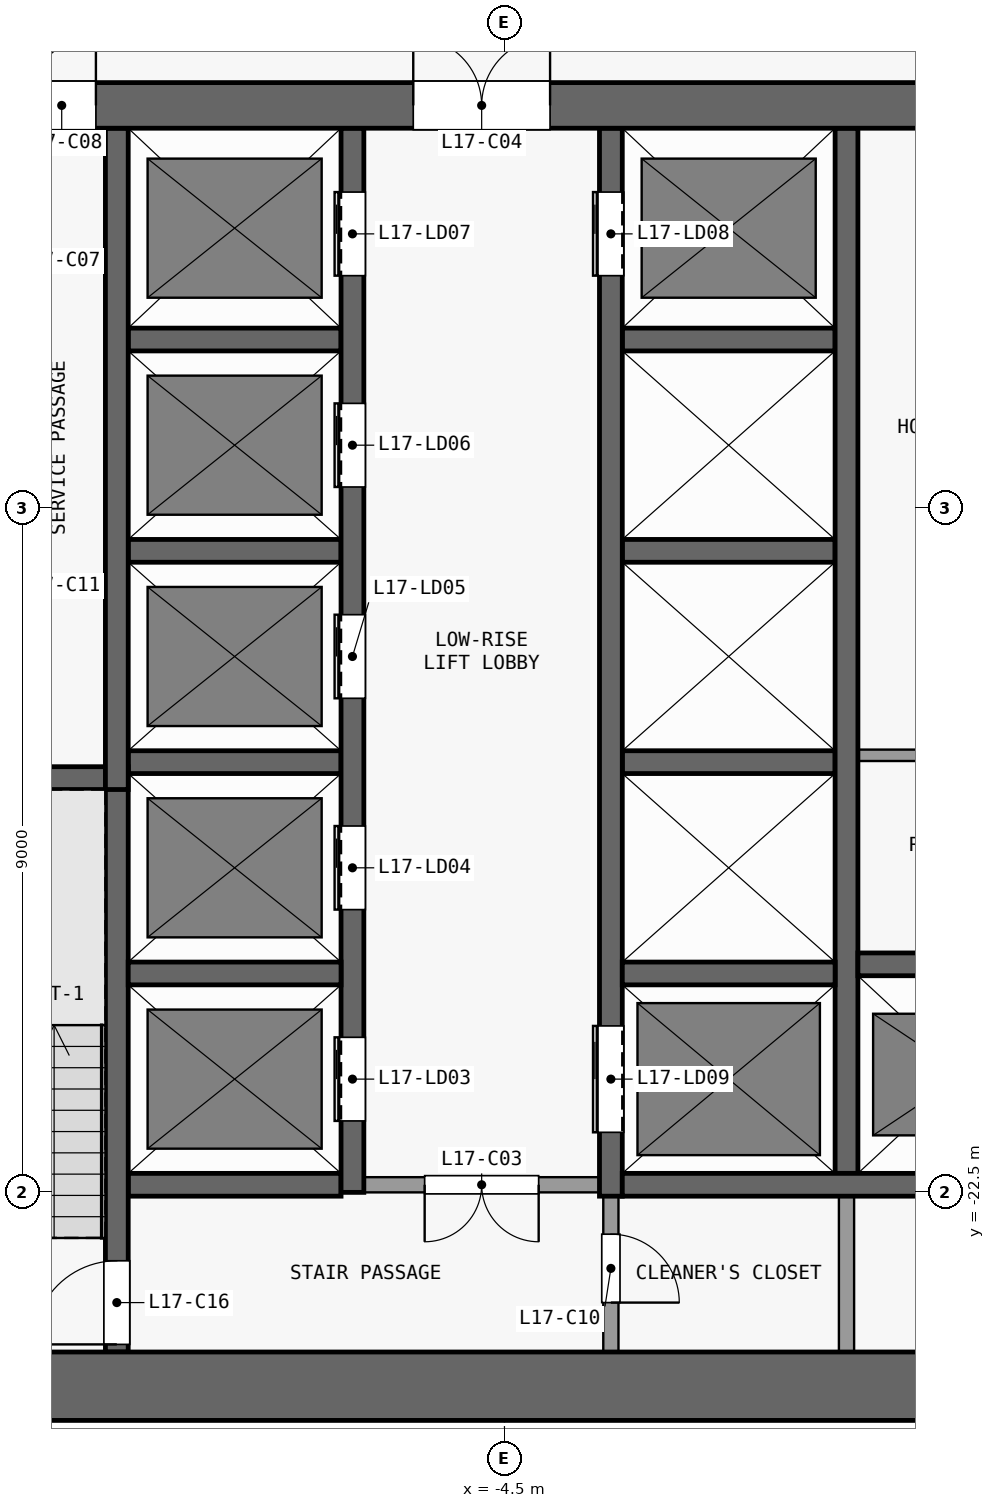
"""IFC4 building model, lengths in metres.
Left out: names, types, materials, properties, quantities, classifications, styles, units other than length and angle.
Written with IfcOpenShell. Run it as: python <this file> out.ifc"""

import sys

from ifc_helpers import new_model, si_unit, direction, frame, frame_2d, origin, place, context, subcontext, project, spatial, rectangle, extrude, element, fill, save


model = new_model("IFC4")
c1 = context("Model", 3, precision=1e-05, world=origin(), true_north=direction((0.0, 1.0)))
c2 = subcontext(c1, "Body", "Model", "MODEL_VIEW")
j1 = project(units=[si_unit("LENGTHUNIT", "METRE"), si_unit("PLANEANGLEUNIT", "RADIAN")], contexts=[c1])
p1 = place(None, origin())
s1 = spatial("IfcSite", under=j1, at=p1, CompositionType="ELEMENT")
p2 = place(p1, origin())
s2 = spatial("IfcBuilding", under=s1, at=p2, CompositionType="ELEMENT")
p3 = place(p2, frame((0.0, 0.0, 72.1)))
s3 = spatial("IfcBuildingStorey", under=s2, at=p3, CompositionType="ELEMENT", Elevation=72.1)
p4 = place(p3, frame((-13.5, -25.05, 0.0), z_axis=(0.0, 0.0, 1.0), x_axis=(1.0, 0.0, 0.0)))
e1 = element("IfcWall", 1, at=p4, inside=s3, PredefinedType="SHEAR", context=c2, shape_type="SweptSolid", body=[
    extrude(rectangle(XDim=27.0, YDim=0.9, at=frame_2d((13.5, 0.0))), origin(), (0.0, 0.0, 1.0), 3.15),
])
p5 = place(p3, frame((-13.5, -8.2, 0.0), z_axis=(0.0, 0.0, 1.0), x_axis=(1.0, 0.0, 0.0)))
e2 = element("IfcWall", 2, at=p5, inside=s3, PredefinedType="SHEAR", context=c2, shape_type="SweptSolid", body=[
    extrude(rectangle(XDim=27.0, YDim=0.6, at=frame_2d((13.5, 0.0))), origin(), (0.0, 0.0, 1.0), 3.15),
])
p6 = place(p5, frame((7.8, 0.0, 0.0)))
e3 = element("IfcOpeningElement", 3, at=p6, cuts=e2, PredefinedType="OPENING", context=c2, shape_type="SweptSolid", body=[
    extrude(rectangle(XDim=1.8, YDim=2.1, at=frame_2d((0.9, 1.05))), frame((0.0, 0.31, 0.0), z_axis=(0.0, -1.0, 0.0), x_axis=(1.0, 0.0, 0.0)), (0.0, 0.0, 1.0), 0.62),
])
p7 = place(p5, frame((17.4, 0.0, 0.0)))
e4 = element("IfcOpeningElement", 4, at=p7, cuts=e2, PredefinedType="OPENING", context=c2, shape_type="SweptSolid", body=[
    extrude(rectangle(XDim=1.8, YDim=2.1, at=frame_2d((0.9, 1.05))), frame((0.0, 0.31, 0.0), z_axis=(0.0, -1.0, 0.0), x_axis=(1.0, 0.0, 0.0)), (0.0, 0.0, 1.0), 0.62),
])
p8 = place(p5, frame((2.725, 0.0, 0.0)))
e5 = element("IfcOpeningElement", 5, at=p8, cuts=e2, PredefinedType="OPENING", context=c2, shape_type="SweptSolid", body=[
    extrude(rectangle(XDim=0.9, YDim=2.1, at=frame_2d((0.45, 1.05))), frame((0.0, 0.31, 0.0), z_axis=(0.0, -1.0, 0.0), x_axis=(1.0, 0.0, 0.0)), (0.0, 0.0, 1.0), 0.62),
])
p9 = place(p5, frame((24.075, 0.0, 0.0)))
e6 = element("IfcOpeningElement", 6, at=p9, cuts=e2, PredefinedType="OPENING", context=c2, shape_type="SweptSolid", body=[
    extrude(rectangle(XDim=1.2, YDim=2.1, at=frame_2d((0.6, 1.05))), frame((0.0, 0.31, 0.0), z_axis=(0.0, -1.0, 0.0), x_axis=(1.0, 0.0, 0.0)), (0.0, 0.0, 1.0), 0.62),
])
p10 = place(p3, frame((-9.45, -22.4, 0.0), z_axis=(0.0, 0.0, 1.0), x_axis=(1.0, 0.0, 0.0)))
e7 = element("IfcWall", 7, at=p10, inside=s3, PredefinedType="SHEAR", context=c2, shape_type="SweptSolid", body=[
    extrude(rectangle(XDim=2.8, YDim=0.3, at=frame_2d((1.4, 0.0))), origin(), (0.0, 0.0, 1.0), 3.15),
])
p11 = place(p3, frame((-3.25, -22.4, 0.0), z_axis=(0.0, 0.0, 1.0), x_axis=(-1.0, 0.0, 0.0)))
e8 = element("IfcWall", 8, at=p11, inside=s3, PredefinedType="PARTITIONING", context=c2, shape_type="SweptSolid", body=[
    extrude(rectangle(XDim=3.1, YDim=0.2, at=frame_2d((1.55, 0.0))), origin(), (0.0, 0.0, 1.0), 3.15),
])
p12 = place(p11, frame((0.8, 0.0, 0.0)))
e9 = element("IfcOpeningElement", 9, at=p12, cuts=e8, PredefinedType="OPENING", context=c2, shape_type="SweptSolid", body=[
    extrude(rectangle(XDim=1.5, YDim=2.1, at=frame_2d((0.75, 1.05))), frame((0.0, 0.11, 0.0), z_axis=(0.0, -1.0, 0.0), x_axis=(1.0, 0.0, 0.0)), (0.0, 0.0, 1.0), 0.22),
])
p13 = place(p3, frame((-2.95, -22.4, 0.0), z_axis=(0.0, 0.0, 1.0), x_axis=(1.0, 0.0, 0.0)))
e10 = element("IfcWall", 10, at=p13, inside=s3, PredefinedType="SHEAR", context=c2, shape_type="SweptSolid", body=[
    extrude(rectangle(XDim=6.2, YDim=0.3, at=frame_2d((3.1, 0.0))), origin(), (0.0, 0.0, 1.0), 3.15),
])
for number, where, z_axis, x_axis in (
    (11, (-9.45, -19.62, 0.0), (0.0, 0.0, 1.0), (1.0, 0.0, 0.0)),
    (12, (-2.95, -19.62, 0.0), (0.0, 0.0, 1.0), (1.0, 0.0, 0.0)),
):
    element("IfcWall", number, at=place(p3, frame(where, z_axis=z_axis, x_axis=x_axis)), inside=s3, PredefinedType="SHEAR", context=c2, shape_type="SweptSolid", body=[
        extrude(rectangle(XDim=2.8, YDim=0.3, at=frame_2d((1.4, 0.0))), origin(), (0.0, 0.0, 1.0), 3.15),
    ])
p14 = place(p3, frame((0.15, -19.5, 0.0), z_axis=(0.0, 0.0, 1.0), x_axis=(1.0, 0.0, 0.0)))
e13 = element("IfcWall", 13, at=p14, inside=s3, PredefinedType="SHEAR", context=c2, shape_type="SweptSolid", body=[
    extrude(rectangle(XDim=3.025, YDim=0.3, at=frame_2d((1.513, 0.0))), origin(), (0.0, 0.0, 1.0), 3.15),
])
p15 = place(p3, frame((-12.6, -17.05, 0.0), z_axis=(0.0, 0.0, 1.0), x_axis=(1.0, 0.0, 0.0)))
e14 = element("IfcWall", 14, at=p15, inside=s3, PredefinedType="SHEAR", context=c2, shape_type="SweptSolid", body=[
    extrude(rectangle(XDim=2.85, YDim=0.3, at=frame_2d((1.425, 0.0))), origin(), (0.0, 0.0, 1.0), 3.15),
])
for number, where, z_axis, x_axis in (
    (15, (-9.45, -16.84, 0.0), (0.0, 0.0, 1.0), (1.0, 0.0, 0.0)),
    (16, (-2.95, -16.84, 0.0), (0.0, 0.0, 1.0), (1.0, 0.0, 0.0)),
):
    element("IfcWall", number, at=place(p3, frame(where, z_axis=z_axis, x_axis=x_axis)), inside=s3, PredefinedType="SHEAR", context=c2, shape_type="SweptSolid", body=[
        extrude(rectangle(XDim=2.8, YDim=0.3, at=frame_2d((1.4, 0.0))), origin(), (0.0, 0.0, 1.0), 3.15),
    ])
p16 = place(p3, frame((0.15, -16.75, 0.0), z_axis=(0.0, 0.0, 1.0), x_axis=(1.0, 0.0, 0.0)))
e17 = element("IfcWall", 17, at=p16, inside=s3, PredefinedType="PARTITIONING", context=c2, shape_type="SweptSolid", body=[
    extrude(rectangle(XDim=2.875, YDim=0.15, at=frame_2d((1.438, 0.0))), origin(), (0.0, 0.0, 1.0), 3.15),
])
for number, where, z_axis, x_axis in (
    (18, (-9.45, -14.06, 0.0), (0.0, 0.0, 1.0), (1.0, 0.0, 0.0)),
    (19, (-2.95, -14.06, 0.0), (0.0, 0.0, 1.0), (1.0, 0.0, 0.0)),
    (20, (-9.45, -11.28, 0.0), (0.0, 0.0, 1.0), (1.0, 0.0, 0.0)),
    (21, (-2.95, -11.28, 0.0), (0.0, 0.0, 1.0), (1.0, 0.0, 0.0)),
):
    element("IfcWall", number, at=place(p3, frame(where, z_axis=z_axis, x_axis=x_axis)), inside=s3, PredefinedType="SHEAR", context=c2, shape_type="SweptSolid", body=[
        extrude(rectangle(XDim=2.8, YDim=0.3, at=frame_2d((1.4, 0.0))), origin(), (0.0, 0.0, 1.0), 3.15),
    ])
p17 = place(p3, frame((-9.6, -24.6, 0.0), z_axis=(0.0, 0.0, 1.0), x_axis=(0.0, 1.0, 0.0)))
e22 = element("IfcWall", 22, at=p17, inside=s3, PredefinedType="SHEAR", context=c2, shape_type="SweptSolid", body=[
    extrude(rectangle(XDim=7.7, YDim=0.3, at=frame_2d((3.85, 0.0))), origin(), (0.0, 0.0, 1.0), 3.15),
])
p18 = place(p17, frame((0.1, 0.0, 0.0)))
e23 = element("IfcOpeningElement", 23, at=p18, cuts=e22, PredefinedType="OPENING", context=c2, shape_type="SweptSolid", body=[
    extrude(rectangle(XDim=1.1, YDim=2.1, at=frame_2d((0.55, 1.05))), frame((0.0, 0.16, 0.0), z_axis=(0.0, -1.0, 0.0), x_axis=(1.0, 0.0, 0.0)), (0.0, 0.0, 1.0), 0.32),
])
p19 = place(p3, frame((-9.6, -17.2, 0.0), z_axis=(0.0, 0.0, 1.0), x_axis=(0.0, 1.0, 0.0)))
e24 = element("IfcWall", 24, at=p19, inside=s3, PredefinedType="SHEAR", context=c2, shape_type="SweptSolid", body=[
    extrude(rectangle(XDim=8.7, YDim=0.3, at=frame_2d((4.35, 0.0))), origin(), (0.0, 0.0, 1.0), 3.15),
])
p20 = place(p3, frame((-6.5, -22.5, 0.0), z_axis=(0.0, 0.0, 1.0), x_axis=(0.0, 1.0, 0.0)))
e25 = element("IfcWall", 25, at=p20, inside=s3, PredefinedType="SHEAR", context=c2, shape_type="SweptSolid", body=[
    extrude(rectangle(XDim=14.0, YDim=0.3, at=frame_2d((7.0, 0.0))), origin(), (0.0, 0.0, 1.0), 3.15),
])
p21 = place(p20, frame((0.94, 0.0, 0.0)))
e26 = element("IfcOpeningElement", 26, at=p21, cuts=e25, PredefinedType="OPENING", context=c2, shape_type="SweptSolid", body=[
    extrude(rectangle(XDim=1.1, YDim=2.1, at=frame_2d((0.55, 1.05))), frame((0.0, 0.16, 0.0), z_axis=(0.0, -1.0, 0.0), x_axis=(1.0, 0.0, 0.0)), (0.0, 0.0, 1.0), 0.32),
])
p22 = place(p20, frame((3.72, 0.0, 0.0)))
e27 = element("IfcOpeningElement", 27, at=p22, cuts=e25, PredefinedType="OPENING", context=c2, shape_type="SweptSolid", body=[
    extrude(rectangle(XDim=1.1, YDim=2.1, at=frame_2d((0.55, 1.05))), frame((0.0, 0.16, 0.0), z_axis=(0.0, -1.0, 0.0), x_axis=(1.0, 0.0, 0.0)), (0.0, 0.0, 1.0), 0.32),
])
p23 = place(p20, frame((6.5, 0.0, 0.0)))
e28 = element("IfcOpeningElement", 28, at=p23, cuts=e25, PredefinedType="OPENING", context=c2, shape_type="SweptSolid", body=[
    extrude(rectangle(XDim=1.1, YDim=2.1, at=frame_2d((0.55, 1.05))), frame((0.0, 0.16, 0.0), z_axis=(0.0, -1.0, 0.0), x_axis=(1.0, 0.0, 0.0)), (0.0, 0.0, 1.0), 0.32),
])
p24 = place(p20, frame((9.28, 0.0, 0.0)))
e29 = element("IfcOpeningElement", 29, at=p24, cuts=e25, PredefinedType="OPENING", context=c2, shape_type="SweptSolid", body=[
    extrude(rectangle(XDim=1.1, YDim=2.1, at=frame_2d((0.55, 1.05))), frame((0.0, 0.16, 0.0), z_axis=(0.0, -1.0, 0.0), x_axis=(1.0, 0.0, 0.0)), (0.0, 0.0, 1.0), 0.32),
])
p25 = place(p20, frame((12.06, 0.0, 0.0)))
e30 = element("IfcOpeningElement", 30, at=p25, cuts=e25, PredefinedType="OPENING", context=c2, shape_type="SweptSolid", body=[
    extrude(rectangle(XDim=1.1, YDim=2.1, at=frame_2d((0.55, 1.05))), frame((0.0, 0.16, 0.0), z_axis=(0.0, -1.0, 0.0), x_axis=(1.0, 0.0, 0.0)), (0.0, 0.0, 1.0), 0.32),
])
p26 = place(p3, frame((-3.1, -22.55, 0.0), z_axis=(0.0, 0.0, 1.0), x_axis=(0.0, -1.0, 0.0)))
e31 = element("IfcWall", 31, at=p26, inside=s3, PredefinedType="PARTITIONING", context=c2, shape_type="SweptSolid", body=[
    extrude(rectangle(XDim=2.05, YDim=0.2, at=frame_2d((1.025, 0.0))), origin(), (0.0, 0.0, 1.0), 3.15),
])
p27 = place(p26, frame((0.5, 0.0, 0.0)))
e32 = element("IfcOpeningElement", 32, at=p27, cuts=e31, PredefinedType="OPENING", context=c2, shape_type="SweptSolid", body=[
    extrude(rectangle(XDim=0.9, YDim=2.1, at=frame_2d((0.45, 1.05))), frame((0.0, 0.11, 0.0), z_axis=(0.0, -1.0, 0.0), x_axis=(1.0, 0.0, 0.0)), (0.0, 0.0, 1.0), 0.22),
])
p28 = place(p3, frame((-3.1, -22.55, 0.0), z_axis=(0.0, 0.0, 1.0), x_axis=(0.0, 1.0, 0.0)))
e33 = element("IfcWall", 33, at=p28, inside=s3, PredefinedType="SHEAR", context=c2, shape_type="SweptSolid", body=[
    extrude(rectangle(XDim=14.05, YDim=0.3, at=frame_2d((7.025, 0.0))), origin(), (0.0, 0.0, 1.0), 3.15),
])
p29 = place(p28, frame((12.11, 0.0, 0.0)))
e34 = element("IfcOpeningElement", 34, at=p29, cuts=e33, PredefinedType="OPENING", context=c2, shape_type="SweptSolid", body=[
    extrude(rectangle(XDim=1.1, YDim=2.1, at=frame_2d((0.55, 1.05))), frame((0.0, 0.16, 0.0), z_axis=(0.0, -1.0, 0.0), x_axis=(1.0, 0.0, 0.0)), (0.0, 0.0, 1.0), 0.32),
])
p30 = place(p28, frame((0.84, 0.0, 0.0)))
e35 = element("IfcOpeningElement", 35, at=p30, cuts=e33, PredefinedType="OPENING", context=c2, shape_type="SweptSolid", body=[
    extrude(rectangle(XDim=1.4, YDim=2.1, at=frame_2d((0.7, 1.05))), frame((0.0, 0.16, 0.0), z_axis=(0.0, -1.0, 0.0), x_axis=(1.0, 0.0, 0.0)), (0.0, 0.0, 1.0), 0.32),
])
p31 = place(p3, frame((0.0, -24.6, 0.0), z_axis=(0.0, 0.0, 1.0), x_axis=(0.0, 1.0, 0.0)))
e36 = element("IfcWall", 36, at=p31, inside=s3, PredefinedType="PARTITIONING", context=c2, shape_type="SweptSolid", body=[
    extrude(rectangle(XDim=2.05, YDim=0.2, at=frame_2d((1.025, 0.0))), origin(), (0.0, 0.0, 1.0), 3.15),
])
p32 = place(p3, frame((0.0, -22.25, 0.0), z_axis=(0.0, 0.0, 1.0), x_axis=(0.0, 1.0, 0.0)))
e37 = element("IfcWall", 37, at=p32, inside=s3, PredefinedType="SHEAR", context=c2, shape_type="SweptSolid", body=[
    extrude(rectangle(XDim=13.75, YDim=0.3, at=frame_2d((6.875, 0.0))), origin(), (0.0, 0.0, 1.0), 3.15),
])
p33 = place(p21, origin())
e38 = element("IfcDoor", 38, at=p33, inside=s3, OperationType="DOUBLE_DOOR_SLIDING", PredefinedType="DOOR", context=c2, shape_type="SweptSolid", body=[
    extrude(rectangle(XDim=1.1, YDim=2.1, at=frame_2d((0.55, 1.05))), frame((0.0, 0.025, 0.0), z_axis=(0.0, -1.0, 0.0), x_axis=(1.0, 0.0, 0.0)), (0.0, 0.0, 1.0), 0.05),
])
fill(e26, e38)
p34 = place(p22, origin())
e39 = element("IfcDoor", 39, at=p34, inside=s3, OperationType="DOUBLE_DOOR_SLIDING", PredefinedType="DOOR", context=c2, shape_type="SweptSolid", body=[
    extrude(rectangle(XDim=1.1, YDim=2.1, at=frame_2d((0.55, 1.05))), frame((0.0, 0.025, 0.0), z_axis=(0.0, -1.0, 0.0), x_axis=(1.0, 0.0, 0.0)), (0.0, 0.0, 1.0), 0.05),
])
fill(e27, e39)
p35 = place(p23, origin())
e40 = element("IfcDoor", 40, at=p35, inside=s3, OperationType="DOUBLE_DOOR_SLIDING", PredefinedType="DOOR", context=c2, shape_type="SweptSolid", body=[
    extrude(rectangle(XDim=1.1, YDim=2.1, at=frame_2d((0.55, 1.05))), frame((0.0, 0.025, 0.0), z_axis=(0.0, -1.0, 0.0), x_axis=(1.0, 0.0, 0.0)), (0.0, 0.0, 1.0), 0.05),
])
fill(e28, e40)
p36 = place(p24, origin())
e41 = element("IfcDoor", 41, at=p36, inside=s3, OperationType="DOUBLE_DOOR_SLIDING", PredefinedType="DOOR", context=c2, shape_type="SweptSolid", body=[
    extrude(rectangle(XDim=1.1, YDim=2.1, at=frame_2d((0.55, 1.05))), frame((0.0, 0.025, 0.0), z_axis=(0.0, -1.0, 0.0), x_axis=(1.0, 0.0, 0.0)), (0.0, 0.0, 1.0), 0.05),
])
fill(e29, e41)
p37 = place(p25, origin())
e42 = element("IfcDoor", 42, at=p37, inside=s3, OperationType="DOUBLE_DOOR_SLIDING", PredefinedType="DOOR", context=c2, shape_type="SweptSolid", body=[
    extrude(rectangle(XDim=1.1, YDim=2.1, at=frame_2d((0.55, 1.05))), frame((0.0, 0.025, 0.0), z_axis=(0.0, -1.0, 0.0), x_axis=(1.0, 0.0, 0.0)), (0.0, 0.0, 1.0), 0.05),
])
fill(e30, e42)
p38 = place(p29, origin())
e43 = element("IfcDoor", 43, at=p38, inside=s3, OperationType="DOUBLE_DOOR_SLIDING", PredefinedType="DOOR", context=c2, shape_type="SweptSolid", body=[
    extrude(rectangle(XDim=1.1, YDim=2.1, at=frame_2d((0.55, 1.05))), frame((0.0, 0.025, 0.0), z_axis=(0.0, -1.0, 0.0), x_axis=(1.0, 0.0, 0.0)), (0.0, 0.0, 1.0), 0.05),
])
fill(e34, e43)
p39 = place(p30, origin())
e44 = element("IfcDoor", 44, at=p39, inside=s3, OperationType="DOUBLE_DOOR_SLIDING", PredefinedType="DOOR", context=c2, shape_type="SweptSolid", body=[
    extrude(rectangle(XDim=1.4, YDim=2.1, at=frame_2d((0.7, 1.05))), frame((0.0, 0.025, 0.0), z_axis=(0.0, -1.0, 0.0), x_axis=(1.0, 0.0, 0.0)), (0.0, 0.0, 1.0), 0.05),
])
fill(e35, e44)
p40 = place(p12, origin())
e45 = element("IfcDoor", 45, at=p40, inside=s3, OperationType="DOUBLE_DOOR_SINGLE_SWING", PredefinedType="DOOR", context=c2, shape_type="SweptSolid", body=[
    extrude(rectangle(XDim=1.5, YDim=2.1, at=frame_2d((0.75, 1.05))), frame((0.0, 0.025, 0.0), z_axis=(0.0, -1.0, 0.0), x_axis=(1.0, 0.0, 0.0)), (0.0, 0.0, 1.0), 0.05),
])
fill(e9, e45)
p41 = place(p6, origin())
e46 = element("IfcDoor", 46, at=p41, inside=s3, OperationType="DOUBLE_DOOR_SINGLE_SWING", PredefinedType="DOOR", context=c2, shape_type="SweptSolid", body=[
    extrude(rectangle(XDim=1.8, YDim=2.1, at=frame_2d((0.9, 1.05))), frame((0.0, 0.025, 0.0), z_axis=(0.0, -1.0, 0.0), x_axis=(1.0, 0.0, 0.0)), (0.0, 0.0, 1.0), 0.05),
])
fill(e3, e46)
p42 = place(p8, origin())
e47 = element("IfcDoor", 47, at=p42, inside=s3, OperationType="SINGLE_SWING_RIGHT", PredefinedType="DOOR", context=c2, shape_type="SweptSolid", body=[
    extrude(rectangle(XDim=0.9, YDim=2.1, at=frame_2d((0.45, 1.05))), frame((0.0, 0.025, 0.0), z_axis=(0.0, -1.0, 0.0), x_axis=(1.0, 0.0, 0.0)), (0.0, 0.0, 1.0), 0.05),
])
fill(e5, e47)
p43 = place(p27, origin())
e48 = element("IfcDoor", 48, at=p43, inside=s3, OperationType="SINGLE_SWING_RIGHT", PredefinedType="DOOR", context=c2, shape_type="SweptSolid", body=[
    extrude(rectangle(XDim=0.9, YDim=2.1, at=frame_2d((0.45, 1.05))), frame((0.0, 0.025, 0.0), z_axis=(0.0, -1.0, 0.0), x_axis=(1.0, 0.0, 0.0)), (0.0, 0.0, 1.0), 0.05),
])
fill(e32, e48)
p44 = place(p18, origin())
e49 = element("IfcDoor", 49, at=p44, inside=s3, OperationType="SINGLE_SWING_LEFT", PredefinedType="DOOR", context=c2, shape_type="SweptSolid", body=[
    extrude(rectangle(XDim=1.1, YDim=2.1, at=frame_2d((0.55, 1.05))), frame((0.0, 0.025, 0.0), z_axis=(0.0, -1.0, 0.0), x_axis=(1.0, 0.0, 0.0)), (0.0, 0.0, 1.0), 0.05),
])
fill(e23, e49)
save(model, sys.argv[1])
